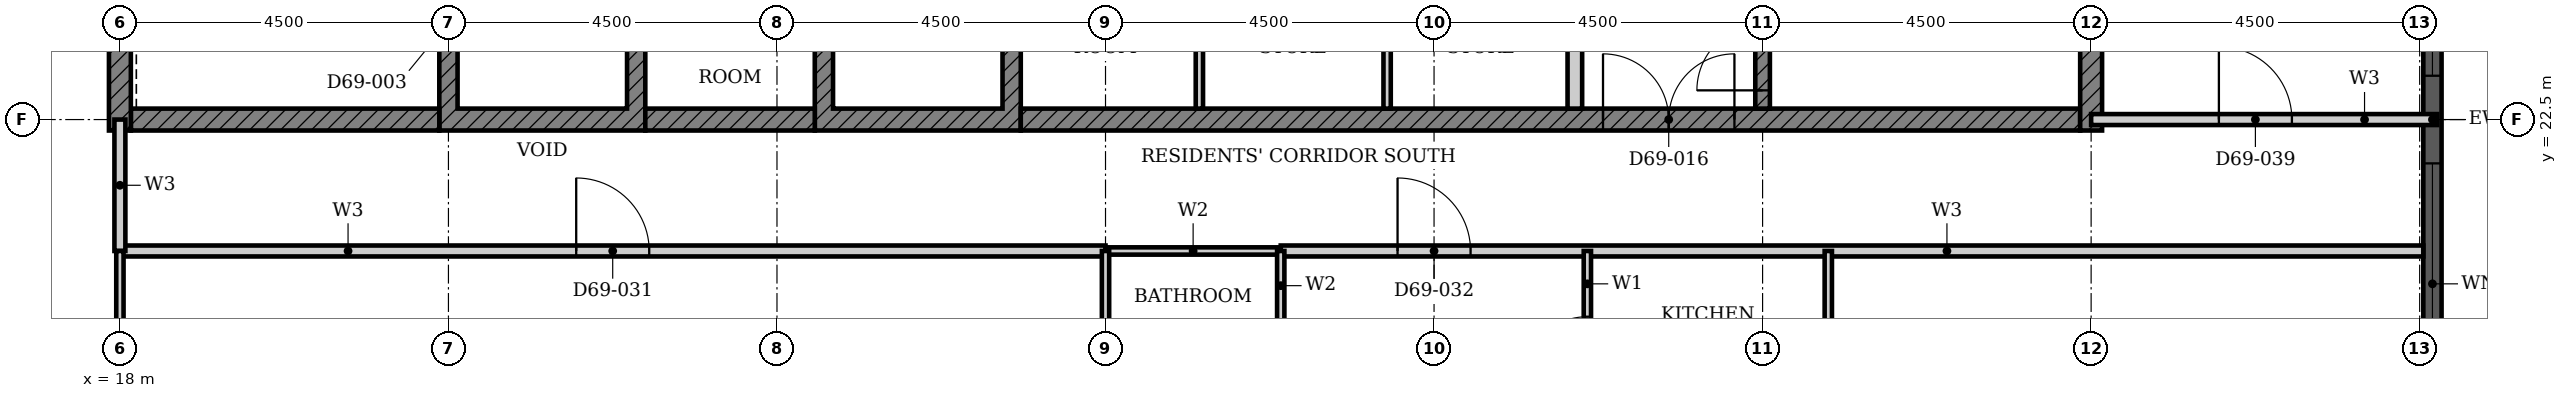
"""IFC4 building model, lengths in metres.
Left out: names, types, materials, properties, quantities, classifications, styles, units other than length and angle.
Written with IfcOpenShell. Run it as: python <this file> out.ifc"""

import sys

from ifc_helpers import new_model, si_unit, direction, frame, frame_2d, origin, place, context, subcontext, project, spatial, polyline, rectangle, outline, extrude, element, fill, save


model = new_model("IFC4")
c1 = context("Model", 3, precision=1e-05, world=origin(), true_north=direction((0.0, 1.0)))
c2 = subcontext(c1, "Body", "Model", "MODEL_VIEW")
j1 = project(units=[si_unit("LENGTHUNIT", "METRE"), si_unit("PLANEANGLEUNIT", "RADIAN")], contexts=[c1])
p1 = place(None, origin())
s1 = spatial("IfcSite", under=j1, at=p1, CompositionType="ELEMENT")
p2 = place(p1, origin())
s2 = spatial("IfcBuilding", under=s1, at=p2, CompositionType="ELEMENT")
p3 = place(p2, frame((0.0, 0.0, 271.2)))
s3 = spatial("IfcBuildingStorey", under=s2, at=p3, CompositionType="ELEMENT", Elevation=271.2)
p4 = place(p3, frame((49.675, 18.3, 0.0), z_axis=(0.0, 0.0, 1.0), x_axis=(0.0, 1.0, 0.0)))
e1 = element("IfcWall", 1, at=p4, inside=s3, PredefinedType="SOLIDWALL", context=c2, shape_type="SweptSolid", body=[
    extrude(rectangle(XDim=8.4, YDim=0.25, at=frame_2d((4.2, 0.0))), origin(), (0.0, 0.0, 1.0), 3.7),
])
p5 = place(p4, frame((0.3, 0.0, 0.45)))
e2 = element("IfcOpeningElement", 2, at=p5, cuts=e1, PredefinedType="OPENING", context=c2, shape_type="SweptSolid", body=[
    extrude(rectangle(XDim=3.3, YDim=2.3, at=frame_2d((1.65, 1.15))), frame((0.0, 0.135, 0.0), z_axis=(0.0, -1.0, 0.0), x_axis=(1.0, 0.0, 0.0)), (0.0, 0.0, 1.0), 0.27),
])
p6 = place(p4, frame((4.8, 0.0, 0.45)))
e3 = element("IfcOpeningElement", 3, at=p6, cuts=e1, PredefinedType="OPENING", context=c2, shape_type="SweptSolid", body=[
    extrude(rectangle(XDim=3.3, YDim=2.3, at=frame_2d((1.65, 1.15))), frame((0.0, 0.135, 0.0), z_axis=(0.0, -1.0, 0.0), x_axis=(1.0, 0.0, 0.0)), (0.0, 0.0, 1.0), 0.27),
])
p7 = place(p3, origin())
e4 = element("IfcWall", 4, at=p7, inside=s3, PredefinedType="SHEAR", context=c2, shape_type="SweptSolid", body=[
    extrude(outline(polyline([(22.375, 22.35), (25.197, 22.35), (25.197, 25.275), (24.947, 25.275), (24.947, 22.65), (22.625, 22.65), (22.625, 25.275), (22.375, 25.275), (22.375, 22.35)])), origin(), (0.0, 0.0, 1.0), 3.4),
])
p8 = place(p3, origin())
e5 = element("IfcWall", 5, at=p8, inside=s3, PredefinedType="SHEAR", context=c2, shape_type="SweptSolid", body=[
    extrude(outline(polyline([(27.518, 22.35), (30.339, 22.35), (30.339, 25.275), (30.089, 25.275), (30.089, 22.65), (27.768, 22.65), (27.768, 25.275), (27.518, 25.275), (27.518, 22.35)])), origin(), (0.0, 0.0, 1.0), 3.4),
])
p9 = place(p3, frame((18.15, 22.5, 0.0), z_axis=(0.0, 0.0, 1.0), x_axis=(1.0, 0.0, 0.0)))
e6 = element("IfcWall", 6, at=p9, inside=s3, PredefinedType="SHEAR", context=c2, shape_type="SweptSolid", body=[
    extrude(rectangle(XDim=4.225, YDim=0.3, at=frame_2d((2.113, 0.0))), origin(), (0.0, 0.0, 1.0), 3.4),
])
p10 = place(p3, frame((25.197, 22.5, 0.0), z_axis=(0.0, 0.0, 1.0), x_axis=(1.0, 0.0, 0.0)))
e7 = element("IfcWall", 7, at=p10, inside=s3, PredefinedType="SHEAR", context=c2, shape_type="SweptSolid", body=[
    extrude(rectangle(XDim=2.321, YDim=0.3, at=frame_2d((1.161, 0.0))), origin(), (0.0, 0.0, 1.0), 3.4),
])
p11 = place(p3, frame((30.339, 22.5, 0.0), z_axis=(0.0, 0.0, 1.0), x_axis=(1.0, 0.0, 0.0)))
e8 = element("IfcWall", 8, at=p11, inside=s3, PredefinedType="SHEAR", context=c2, shape_type="SweptSolid", body=[
    extrude(rectangle(XDim=14.511, YDim=0.3, at=frame_2d((7.255, 0.0))), origin(), (0.0, 0.0, 1.0), 3.4),
])
p12 = place(p11, frame((7.975, 0.0, 0.0)))
e9 = element("IfcOpeningElement", 9, at=p12, cuts=e8, PredefinedType="OPENING", context=c2, shape_type="SweptSolid", body=[
    extrude(rectangle(XDim=1.8, YDim=2.1, at=frame_2d((0.9, 1.05))), frame((0.0, 0.16, 0.0), z_axis=(0.0, -1.0, 0.0), x_axis=(1.0, 0.0, 0.0)), (0.0, 0.0, 1.0), 0.32),
])
for number, where, z_axis, x_axis in (
    (10, (18.0, 22.35, 0.0), (0.0, 0.0, 1.0), (0.0, 1.0, 0.0)),
    (11, (45.0, 22.35, 0.0), (0.0, 0.0, 1.0), (0.0, 1.0, 0.0)),
):
    element("IfcWall", number, at=place(p3, frame(where, z_axis=z_axis, x_axis=x_axis)), inside=s3, PredefinedType="SHEAR", context=c2, shape_type="SweptSolid", body=[
        extrude(rectangle(XDim=9.3, YDim=0.3, at=frame_2d((4.65, 0.0))), origin(), (0.0, 0.0, 1.0), 3.4),
    ])
p13 = place(p3, frame((37.928, 22.65, 0.0), z_axis=(0.0, 0.0, 1.0), x_axis=(0.0, 1.0, 0.0)))
e12 = element("IfcWall", 12, at=p13, inside=s3, PredefinedType="PARTITIONING", context=c2, shape_type="SweptSolid", body=[
    extrude(rectangle(XDim=2.625, YDim=0.2, at=frame_2d((1.312, 0.0))), origin(), (0.0, 0.0, 1.0), 3.4),
])
for number, where, z_axis, x_axis in (
    (13, (32.786, 22.65, 0.0), (0.0, 0.0, 1.0), (0.0, 1.0, 0.0)),
    (14, (35.357, 22.65, 0.0), (0.0, 0.0, 1.0), (0.0, 1.0, 0.0)),
):
    element("IfcWall", number, at=place(p3, frame(where, z_axis=z_axis, x_axis=x_axis)), inside=s3, PredefinedType="PARTITIONING", context=c2, shape_type="SweptSolid", body=[
        extrude(rectangle(XDim=2.625, YDim=0.1, at=frame_2d((1.312, 0.0))), origin(), (0.0, 0.0, 1.0), 3.4),
    ])
p14 = place(p3, frame((40.5, 22.65, 0.0), z_axis=(0.0, 0.0, 1.0), x_axis=(0.0, 1.0, 0.0)))
e15 = element("IfcWall", 15, at=p14, inside=s3, PredefinedType="SHEAR", context=c2, shape_type="SweptSolid", body=[
    extrude(rectangle(XDim=5.825, YDim=0.2, at=frame_2d((2.913, 0.0))), origin(), (0.0, 0.0, 1.0), 3.4),
])
p15 = place(p14, frame((0.25, 0.0, 0.0)))
e16 = element("IfcOpeningElement", 16, at=p15, cuts=e15, PredefinedType="OPENING", context=c2, shape_type="SweptSolid", body=[
    extrude(rectangle(XDim=1.8, YDim=2.1, at=frame_2d((0.9, 1.05))), frame((0.0, 0.11, 0.0), z_axis=(0.0, -1.0, 0.0), x_axis=(1.0, 0.0, 0.0)), (0.0, 0.0, 1.0), 0.22),
])
p16 = place(p3, frame((18.0, 20.7, 0.0), z_axis=(0.0, 0.0, 1.0), x_axis=(1.0, 0.0, 0.0)))
e17 = element("IfcWall", 17, at=p16, inside=s3, PredefinedType="PARTITIONING", context=c2, shape_type="SweptSolid", body=[
    extrude(rectangle(XDim=13.5, YDim=0.15, at=frame_2d((6.75, 0.0))), origin(), (0.0, 0.0, 1.0), 3.4),
])
p17 = place(p16, frame((6.25, 0.0, 0.0)))
e18 = element("IfcOpeningElement", 18, at=p17, cuts=e17, PredefinedType="OPENING", context=c2, shape_type="SweptSolid", body=[
    extrude(rectangle(XDim=1.0, YDim=2.1, at=frame_2d((0.5, 1.05))), frame((0.0, 0.085, 0.0), z_axis=(0.0, -1.0, 0.0), x_axis=(1.0, 0.0, 0.0)), (0.0, 0.0, 1.0), 0.17),
])
p18 = place(p3, frame((33.9, 20.7, 0.0), z_axis=(0.0, 0.0, 1.0), x_axis=(1.0, 0.0, 0.0)))
e19 = element("IfcWall", 19, at=p18, inside=s3, PredefinedType="PARTITIONING", context=c2, shape_type="SweptSolid", body=[
    extrude(rectangle(XDim=15.65, YDim=0.15, at=frame_2d((7.825, 0.0))), origin(), (0.0, 0.0, 1.0), 3.4),
])
p19 = place(p18, frame((1.6, 0.0, 0.0)))
e20 = element("IfcOpeningElement", 20, at=p19, cuts=e19, PredefinedType="OPENING", context=c2, shape_type="SweptSolid", body=[
    extrude(rectangle(XDim=1.0, YDim=2.2, at=frame_2d((0.5, 1.1))), frame((0.0, 0.085, 0.0), z_axis=(0.0, -1.0, 0.0), x_axis=(1.0, 0.0, 0.0)), (0.0, 0.0, 1.0), 0.17),
])
p20 = place(p3, frame((45.0, 22.5, 0.0), z_axis=(0.0, 0.0, 1.0), x_axis=(1.0, 0.0, 0.0)))
e21 = element("IfcWall", 21, at=p20, inside=s3, PredefinedType="PARTITIONING", context=c2, shape_type="SweptSolid", body=[
    extrude(rectangle(XDim=4.74, YDim=0.15, at=frame_2d((2.37, 0.0))), origin(), (0.0, 0.0, 1.0), 3.4),
])
p21 = place(p20, frame((1.75, 0.0, 0.0)))
e22 = element("IfcOpeningElement", 22, at=p21, cuts=e21, PredefinedType="OPENING", context=c2, shape_type="SweptSolid", body=[
    extrude(rectangle(XDim=1.0, YDim=2.1, at=frame_2d((0.5, 1.05))), frame((0.0, 0.085, 0.0), z_axis=(0.0, -1.0, 0.0), x_axis=(1.0, 0.0, 0.0)), (0.0, 0.0, 1.0), 0.17),
])
p22 = place(p3, frame((18.0, 20.7, 0.0), z_axis=(0.0, 0.0, 1.0), x_axis=(0.0, 1.0, 0.0)))
e23 = element("IfcWall", 23, at=p22, inside=s3, PredefinedType="PARTITIONING", context=c2, shape_type="SweptSolid", body=[
    extrude(rectangle(XDim=1.8, YDim=0.15, at=frame_2d((0.9, 0.0))), origin(), (0.0, 0.0, 1.0), 3.4),
])
p23 = place(p3, frame((18.0, 18.0, 0.0), z_axis=(0.0, 0.0, 1.0), x_axis=(0.0, 1.0, 0.0)))
e24 = element("IfcWall", 24, at=p23, inside=s3, PredefinedType="PARTITIONING", context=c2, shape_type="SweptSolid", body=[
    extrude(rectangle(XDim=2.7, YDim=0.1, at=frame_2d((1.35, 0.0))), origin(), (0.0, 0.0, 1.0), 3.4),
])
p24 = place(p3, frame((38.1, 18.0, 0.0), z_axis=(0.0, 0.0, 1.0), x_axis=(0.0, 1.0, 0.0)))
e25 = element("IfcWall", 25, at=p24, inside=s3, PredefinedType="PARTITIONING", context=c2, shape_type="SweptSolid", body=[
    extrude(rectangle(XDim=2.7, YDim=0.1, at=frame_2d((1.35, 0.0))), origin(), (0.0, 0.0, 1.0), 3.4),
])
p25 = place(p24, frame((0.9, 0.0, 0.0)))
e26 = element("IfcOpeningElement", 26, at=p25, cuts=e25, PredefinedType="OPENING", context=c2, shape_type="SweptSolid", body=[
    extrude(rectangle(XDim=0.9, YDim=2.1, at=frame_2d((0.45, 1.05))), frame((0.0, 0.06, 0.0), z_axis=(0.0, -1.0, 0.0), x_axis=(1.0, 0.0, 0.0)), (0.0, 0.0, 1.0), 0.12),
])
p26 = place(p3, frame((41.4, 18.0, 0.0), z_axis=(0.0, 0.0, 1.0), x_axis=(0.0, 1.0, 0.0)))
e27 = element("IfcWall", 27, at=p26, inside=s3, PredefinedType="PARTITIONING", context=c2, shape_type="SweptSolid", body=[
    extrude(rectangle(XDim=2.7, YDim=0.1, at=frame_2d((1.35, 0.0))), origin(), (0.0, 0.0, 1.0), 3.4),
])
p27 = place(p3, frame((31.5, 20.7, 0.0), z_axis=(0.0, 0.0, 1.0), x_axis=(1.0, 0.0, 0.0)))
e28 = element("IfcWall", 28, at=p27, inside=s3, PredefinedType="PARTITIONING", context=c2, shape_type="SweptSolid", body=[
    extrude(rectangle(XDim=2.4, YDim=0.1, at=frame_2d((1.2, 0.0))), origin(), (0.0, 0.0, 1.0), 3.4),
])
p28 = place(p3, frame((31.5, 18.0, 0.0), z_axis=(0.0, 0.0, 1.0), x_axis=(0.0, 1.0, 0.0)))
e29 = element("IfcWall", 29, at=p28, inside=s3, PredefinedType="PARTITIONING", context=c2, shape_type="SweptSolid", body=[
    extrude(rectangle(XDim=2.7, YDim=0.1, at=frame_2d((1.35, 0.0))), origin(), (0.0, 0.0, 1.0), 3.4),
])
p29 = place(p3, frame((33.9, 18.0, 0.0), z_axis=(0.0, 0.0, 1.0), x_axis=(0.0, 1.0, 0.0)))
e30 = element("IfcWall", 30, at=p29, inside=s3, PredefinedType="PARTITIONING", context=c2, shape_type="SweptSolid", body=[
    extrude(rectangle(XDim=2.7, YDim=0.1, at=frame_2d((1.35, 0.0))), origin(), (0.0, 0.0, 1.0), 3.4),
])
p30 = place(p29, frame((0.95, 0.0, 0.0)))
e31 = element("IfcOpeningElement", 31, at=p30, cuts=e30, PredefinedType="OPENING", context=c2, shape_type="SweptSolid", body=[
    extrude(rectangle(XDim=0.8, YDim=2.1, at=frame_2d((0.4, 1.05))), frame((0.0, 0.06, 0.0), z_axis=(0.0, -1.0, 0.0), x_axis=(1.0, 0.0, 0.0)), (0.0, 0.0, 1.0), 0.12),
])
p31 = place(p5, origin())
e32 = element("IfcWindow", 32, at=p31, inside=s3, PartitioningType="SINGLE_PANEL", PredefinedType="WINDOW", context=c2, shape_type="SweptSolid", body=[
    extrude(rectangle(XDim=3.3, YDim=2.3, at=frame_2d((1.65, 1.15))), frame((0.0, 0.03, 0.0), z_axis=(0.0, -1.0, 0.0), x_axis=(1.0, 0.0, 0.0)), (0.0, 0.0, 1.0), 0.06),
])
fill(e2, e32)
p32 = place(p6, origin())
e33 = element("IfcWindow", 33, at=p32, inside=s3, PartitioningType="SINGLE_PANEL", PredefinedType="WINDOW", context=c2, shape_type="SweptSolid", body=[
    extrude(rectangle(XDim=3.3, YDim=2.3, at=frame_2d((1.65, 1.15))), frame((0.0, 0.03, 0.0), z_axis=(0.0, -1.0, 0.0), x_axis=(1.0, 0.0, 0.0)), (0.0, 0.0, 1.0), 0.06),
])
fill(e3, e33)
p33 = place(p15, origin())
e34 = element("IfcDoor", 34, at=p33, inside=s3, OperationType="DOUBLE_DOOR_SINGLE_SWING", PredefinedType="DOOR", context=c2, shape_type="SweptSolid", body=[
    extrude(rectangle(XDim=1.8, YDim=2.1, at=frame_2d((0.9, 1.05))), frame((0.0, 0.025, 0.0), z_axis=(0.0, -1.0, 0.0), x_axis=(1.0, 0.0, 0.0)), (0.0, 0.0, 1.0), 0.05),
])
fill(e16, e34)
p34 = place(p12, origin())
e35 = element("IfcDoor", 35, at=p34, inside=s3, OperationType="DOUBLE_DOOR_SINGLE_SWING", PredefinedType="DOOR", context=c2, shape_type="SweptSolid", body=[
    extrude(rectangle(XDim=1.8, YDim=2.1, at=frame_2d((0.9, 1.05))), frame((0.0, 0.025, 0.0), z_axis=(0.0, -1.0, 0.0), x_axis=(1.0, 0.0, 0.0)), (0.0, 0.0, 1.0), 0.05),
])
fill(e9, e35)
p35 = place(p17, origin())
e36 = element("IfcDoor", 36, at=p35, inside=s3, OperationType="SINGLE_SWING_RIGHT", PredefinedType="DOOR", context=c2, shape_type="SweptSolid", body=[
    extrude(rectangle(XDim=1.0, YDim=2.1, at=frame_2d((0.5, 1.05))), frame((0.0, 0.025, 0.0), z_axis=(0.0, -1.0, 0.0), x_axis=(1.0, 0.0, 0.0)), (0.0, 0.0, 1.0), 0.05),
])
fill(e18, e36)
p36 = place(p19, origin())
e37 = element("IfcDoor", 37, at=p36, inside=s3, OperationType="SINGLE_SWING_LEFT", PredefinedType="DOOR", context=c2, shape_type="SweptSolid", body=[
    extrude(rectangle(XDim=1.0, YDim=2.2, at=frame_2d((0.5, 1.1))), frame((0.0, 0.025, 0.0), z_axis=(0.0, -1.0, 0.0), x_axis=(1.0, 0.0, 0.0)), (0.0, 0.0, 1.0), 0.05),
])
fill(e20, e37)
p37 = place(p25, origin())
e38 = element("IfcDoor", 38, at=p37, inside=s3, OperationType="SINGLE_SWING_RIGHT", PredefinedType="DOOR", context=c2, shape_type="SweptSolid", body=[
    extrude(rectangle(XDim=0.9, YDim=2.1, at=frame_2d((0.45, 1.05))), frame((0.0, 0.025, 0.0), z_axis=(0.0, -1.0, 0.0), x_axis=(1.0, 0.0, 0.0)), (0.0, 0.0, 1.0), 0.05),
])
fill(e26, e38)
p38 = place(p21, origin())
e39 = element("IfcDoor", 39, at=p38, inside=s3, OperationType="SINGLE_SWING_LEFT", PredefinedType="DOOR", context=c2, shape_type="SweptSolid", body=[
    extrude(rectangle(XDim=1.0, YDim=2.1, at=frame_2d((0.5, 1.05))), frame((0.0, 0.025, 0.0), z_axis=(0.0, -1.0, 0.0), x_axis=(1.0, 0.0, 0.0)), (0.0, 0.0, 1.0), 0.05),
])
fill(e22, e39)
save(model, sys.argv[1])
